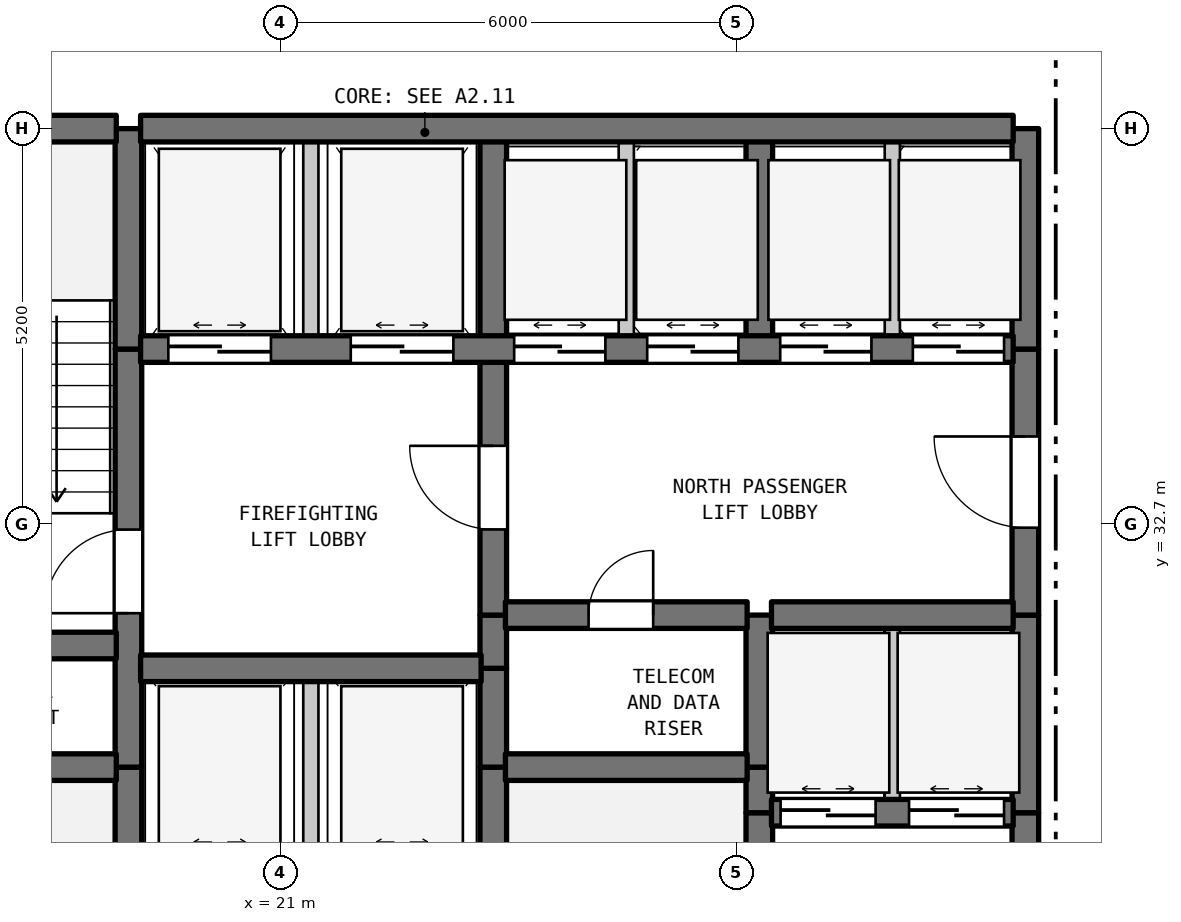
"""IFC4 building model, lengths in metres.
Left out: names, types, materials, properties, quantities, classifications, styles, units other than length and angle.
Written with IfcOpenShell. Run it as: python <this file> out.ifc"""

import sys

from ifc_helpers import new_model, si_unit, direction, frame, frame_2d, origin, place, context, subcontext, project, spatial, rectangle, extrude, element, fill, save


model = new_model("IFC4")
c1 = context("Model", 3, precision=1e-05, world=origin(), true_north=direction((0.0, 1.0)))
c2 = subcontext(c1, "Body", "Model", "MODEL_VIEW")
j1 = project(units=[si_unit("LENGTHUNIT", "METRE"), si_unit("PLANEANGLEUNIT", "RADIAN")], contexts=[c1])
p1 = place(None, origin())
s1 = spatial("IfcSite", under=j1, at=p1, CompositionType="ELEMENT")
p2 = place(p1, origin())
s2 = spatial("IfcBuilding", under=s1, at=p2, CompositionType="ELEMENT")
p3 = place(p2, frame((0.0, 0.0, 94.6)))
s3 = spatial("IfcBuildingStorey", under=s2, at=p3, CompositionType="ELEMENT", Elevation=94.6)
p4 = place(p3, frame((19.0, 28.2, 0.0), z_axis=(0.0, 0.0, 1.0), x_axis=(0.0, 1.0, 0.0)))
e1 = element("IfcWall", 1, at=p4, inside=s3, PredefinedType="SHEAR", context=c2, shape_type="SweptSolid", body=[
    extrude(rectangle(XDim=1.3, YDim=0.35, at=frame_2d((0.65, 0.0))), origin(), (0.0, 0.0, 1.0), 3.385),
])
p5 = place(p3, frame((19.0, 29.5, 0.0), z_axis=(0.0, 0.0, 1.0), x_axis=(0.0, 1.0, 0.0)))
e2 = element("IfcWall", 2, at=p5, inside=s3, PredefinedType="SHEAR", context=c2, shape_type="SweptSolid", body=[
    extrude(rectangle(XDim=5.5, YDim=0.35, at=frame_2d((2.75, 0.0))), origin(), (0.0, 0.0, 1.0), 3.385),
])
p6 = place(p5, frame((2.025, 0.0, 0.0)))
e3 = element("IfcOpeningElement", 3, at=p6, cuts=e2, PredefinedType="OPENING", context=c2, shape_type="SweptSolid", body=[
    extrude(rectangle(XDim=1.1, YDim=2.15, at=frame_2d((0.55, 1.075))), frame((0.0, 0.185, 0.0), z_axis=(0.0, -1.0, 0.0), x_axis=(1.0, 0.0, 0.0)), (0.0, 0.0, 1.0), 0.37),
])
p7 = place(p3, frame((19.0, 35.0, 0.0), z_axis=(0.0, 0.0, 1.0), x_axis=(0.0, 1.0, 0.0)))
e4 = element("IfcWall", 4, at=p7, inside=s3, PredefinedType="SHEAR", context=c2, shape_type="SweptSolid", body=[
    extrude(rectangle(XDim=2.9, YDim=0.35, at=frame_2d((1.45, 0.0))), origin(), (0.0, 0.0, 1.0), 3.385),
])
p8 = place(p3, frame((21.4, 28.2, 0.0), z_axis=(0.0, 0.0, 1.0), x_axis=(0.0, 1.0, 0.0)))
e5 = element("IfcWall", 5, at=p8, inside=s3, PredefinedType="STANDARD", context=c2, shape_type="SweptSolid", body=[
    extrude(rectangle(XDim=2.6, YDim=0.2, at=frame_2d((1.3, 0.0))), origin(), (0.0, 0.0, 1.0), 3.385),
])
p9 = place(p3, frame((21.4, 35.0, 0.0), z_axis=(0.0, 0.0, 1.0), x_axis=(0.0, 1.0, 0.0)))
e6 = element("IfcWall", 6, at=p9, inside=s3, PredefinedType="STANDARD", context=c2, shape_type="SweptSolid", body=[
    extrude(rectangle(XDim=2.9, YDim=0.2, at=frame_2d((1.45, 0.0))), origin(), (0.0, 0.0, 1.0), 3.385),
])
for number, where, z_axis, x_axis in (
    (7, (23.8, 28.2, 0.0), (0.0, 0.0, 1.0), (0.0, 1.0, 0.0)),
    (8, (23.8, 29.5, 0.0), (0.0, 0.0, 1.0), (0.0, 1.0, 0.0)),
):
    element("IfcWall", number, at=place(p3, frame(where, z_axis=z_axis, x_axis=x_axis)), inside=s3, PredefinedType="SHEAR", context=c2, shape_type="SweptSolid", body=[
        extrude(rectangle(XDim=1.3, YDim=0.35, at=frame_2d((0.65, 0.0))), origin(), (0.0, 0.0, 1.0), 3.385),
    ])
p10 = place(p3, frame((23.8, 30.8, 0.0), z_axis=(0.0, 0.0, 1.0), x_axis=(0.0, 1.0, 0.0)))
e9 = element("IfcWall", 9, at=p10, inside=s3, PredefinedType="SHEAR", context=c2, shape_type="SweptSolid", body=[
    extrude(rectangle(XDim=0.7, YDim=0.35, at=frame_2d((0.35, 0.0))), origin(), (0.0, 0.0, 1.0), 3.385),
])
p11 = place(p3, frame((23.8, 31.5, 0.0), z_axis=(0.0, 0.0, 1.0), x_axis=(0.0, 1.0, 0.0)))
e10 = element("IfcWall", 10, at=p11, inside=s3, PredefinedType="SHEAR", context=c2, shape_type="SweptSolid", body=[
    extrude(rectangle(XDim=3.5, YDim=0.35, at=frame_2d((1.75, 0.0))), origin(), (0.0, 0.0, 1.0), 3.385),
])
p12 = place(p11, frame((1.127, 0.0, 0.0)))
e11 = element("IfcOpeningElement", 11, at=p12, cuts=e10, PredefinedType="OPENING", context=c2, shape_type="SweptSolid", body=[
    extrude(rectangle(XDim=1.1, YDim=2.15, at=frame_2d((0.55, 1.075))), frame((0.0, 0.185, 0.0), z_axis=(0.0, -1.0, 0.0), x_axis=(1.0, 0.0, 0.0)), (0.0, 0.0, 1.0), 0.37),
])
p13 = place(p3, frame((23.8, 35.0, 0.0), z_axis=(0.0, 0.0, 1.0), x_axis=(0.0, 1.0, 0.0)))
e12 = element("IfcWall", 12, at=p13, inside=s3, PredefinedType="SHEAR", context=c2, shape_type="SweptSolid", body=[
    extrude(rectangle(XDim=2.9, YDim=0.35, at=frame_2d((1.45, 0.0))), origin(), (0.0, 0.0, 1.0), 3.385),
])
p14 = place(p3, frame((25.55, 35.0, 0.0), z_axis=(0.0, 0.0, 1.0), x_axis=(0.0, 1.0, 0.0)))
e13 = element("IfcWall", 13, at=p14, inside=s3, PredefinedType="STANDARD", context=c2, shape_type="SweptSolid", body=[
    extrude(rectangle(XDim=2.9, YDim=0.2, at=frame_2d((1.45, 0.0))), origin(), (0.0, 0.0, 1.0), 3.385),
])
p15 = place(p3, frame((27.3, 25.6, 0.0), z_axis=(0.0, 0.0, 1.0), x_axis=(0.0, 1.0, 0.0)))
e14 = element("IfcWall", 14, at=p15, inside=s3, PredefinedType="SHEAR", context=c2, shape_type="SweptSolid", body=[
    extrude(rectangle(XDim=3.3, YDim=0.35, at=frame_2d((1.65, 0.0))), origin(), (0.0, 0.0, 1.0), 3.385),
])
p16 = place(p3, frame((27.3, 28.9, 0.0), z_axis=(0.0, 0.0, 1.0), x_axis=(0.0, 1.0, 0.0)))
e15 = element("IfcWall", 15, at=p16, inside=s3, PredefinedType="SHEAR", context=c2, shape_type="SweptSolid", body=[
    extrude(rectangle(XDim=0.6, YDim=0.35, at=frame_2d((0.3, 0.0))), origin(), (0.0, 0.0, 1.0), 3.385),
])
p17 = place(p3, frame((27.3, 29.5, 0.0), z_axis=(0.0, 0.0, 1.0), x_axis=(0.0, 1.0, 0.0)))
e16 = element("IfcWall", 16, at=p17, inside=s3, PredefinedType="SHEAR", context=c2, shape_type="SweptSolid", body=[
    extrude(rectangle(XDim=2.0, YDim=0.35, at=frame_2d((1.0, 0.0))), origin(), (0.0, 0.0, 1.0), 3.385),
])
p18 = place(p3, frame((27.3, 35.0, 0.0), z_axis=(0.0, 0.0, 1.0), x_axis=(0.0, 1.0, 0.0)))
e17 = element("IfcWall", 17, at=p18, inside=s3, PredefinedType="SHEAR", context=c2, shape_type="SweptSolid", body=[
    extrude(rectangle(XDim=2.9, YDim=0.35, at=frame_2d((1.45, 0.0))), origin(), (0.0, 0.0, 1.0), 3.385),
])
p19 = place(p3, frame((29.05, 28.9, 0.0), z_axis=(0.0, 0.0, 1.0), x_axis=(0.0, 1.0, 0.0)))
e18 = element("IfcWall", 18, at=p19, inside=s3, PredefinedType="STANDARD", context=c2, shape_type="SweptSolid", body=[
    extrude(rectangle(XDim=2.6, YDim=0.2, at=frame_2d((1.3, 0.0))), origin(), (0.0, 0.0, 1.0), 3.385),
])
p20 = place(p3, frame((29.05, 35.0, 0.0), z_axis=(0.0, 0.0, 1.0), x_axis=(0.0, 1.0, 0.0)))
e19 = element("IfcWall", 19, at=p20, inside=s3, PredefinedType="STANDARD", context=c2, shape_type="SweptSolid", body=[
    extrude(rectangle(XDim=2.9, YDim=0.2, at=frame_2d((1.45, 0.0))), origin(), (0.0, 0.0, 1.0), 3.385),
])
p21 = place(p3, frame((30.8, 25.6, 0.0), z_axis=(0.0, 0.0, 1.0), x_axis=(0.0, 1.0, 0.0)))
e20 = element("IfcWall", 20, at=p21, inside=s3, PredefinedType="SHEAR", context=c2, shape_type="SweptSolid", body=[
    extrude(rectangle(XDim=3.3, YDim=0.35, at=frame_2d((1.65, 0.0))), origin(), (0.0, 0.0, 1.0), 3.385),
])
p22 = place(p21, frame((0.978, 0.0, 0.0)))
e21 = element("IfcOpeningElement", 21, at=p22, cuts=e20, PredefinedType="OPENING", context=c2, shape_type="SweptSolid", body=[
    extrude(rectangle(XDim=1.2, YDim=2.2, at=frame_2d((0.6, 1.1))), frame((0.0, 0.185, 0.0), z_axis=(0.0, -1.0, 0.0), x_axis=(1.0, 0.0, 0.0)), (0.0, 0.0, 1.0), 0.37),
])
p23 = place(p3, frame((30.8, 28.9, 0.0), z_axis=(0.0, 0.0, 1.0), x_axis=(0.0, 1.0, 0.0)))
e22 = element("IfcWall", 22, at=p23, inside=s3, PredefinedType="SHEAR", context=c2, shape_type="SweptSolid", body=[
    extrude(rectangle(XDim=2.6, YDim=0.35, at=frame_2d((1.3, 0.0))), origin(), (0.0, 0.0, 1.0), 3.385),
])
p24 = place(p3, frame((30.8, 31.5, 0.0), z_axis=(0.0, 0.0, 1.0), x_axis=(0.0, 1.0, 0.0)))
e23 = element("IfcWall", 23, at=p24, inside=s3, PredefinedType="SHEAR", context=c2, shape_type="SweptSolid", body=[
    extrude(rectangle(XDim=3.5, YDim=0.35, at=frame_2d((1.75, 0.0))), origin(), (0.0, 0.0, 1.0), 3.385),
])
p25 = place(p24, frame((1.15, 0.0, 0.0)))
e24 = element("IfcOpeningElement", 24, at=p25, cuts=e23, PredefinedType="OPENING", context=c2, shape_type="SweptSolid", body=[
    extrude(rectangle(XDim=1.2, YDim=2.2, at=frame_2d((0.6, 1.1))), frame((0.0, 0.185, 0.0), z_axis=(0.0, -1.0, 0.0), x_axis=(1.0, 0.0, 0.0)), (0.0, 0.0, 1.0), 0.37),
])
p26 = place(p3, frame((30.8, 35.0, 0.0), z_axis=(0.0, 0.0, 1.0), x_axis=(0.0, 1.0, 0.0)))
e25 = element("IfcWall", 25, at=p26, inside=s3, PredefinedType="SHEAR", context=c2, shape_type="SweptSolid", body=[
    extrude(rectangle(XDim=2.9, YDim=0.35, at=frame_2d((1.45, 0.0))), origin(), (0.0, 0.0, 1.0), 3.385),
])
p27 = place(p3, frame((27.46, 28.9, 0.0), z_axis=(0.0, 0.0, 1.0), x_axis=(1.0, 0.0, 0.0)))
e26 = element("IfcWall", 26, at=p27, inside=s3, PredefinedType="SHEAR", context=c2, shape_type="SweptSolid", body=[
    extrude(rectangle(XDim=3.18, YDim=0.35, at=frame_2d((1.59, 0.0))), origin(), (0.0, 0.0, 1.0), 3.385),
])
p28 = place(p27, frame((0.12, 0.0, 0.0)))
e27 = element("IfcOpeningElement", 27, at=p28, cuts=e26, PredefinedType="OPENING", context=c2, shape_type="SweptSolid", body=[
    extrude(rectangle(XDim=1.25, YDim=2.2, at=frame_2d((0.625, 1.1))), frame((0.0, 0.185, 0.0), z_axis=(0.0, -1.0, 0.0), x_axis=(1.0, 0.0, 0.0)), (0.0, 0.0, 1.0), 0.37),
])
p29 = place(p27, frame((1.81, 0.0, 0.0)))
e28 = element("IfcOpeningElement", 28, at=p29, cuts=e26, PredefinedType="OPENING", context=c2, shape_type="SweptSolid", body=[
    extrude(rectangle(XDim=1.25, YDim=2.2, at=frame_2d((0.625, 1.1))), frame((0.0, 0.185, 0.0), z_axis=(0.0, -1.0, 0.0), x_axis=(1.0, 0.0, 0.0)), (0.0, 0.0, 1.0), 0.37),
])
p30 = place(p3, frame((15.16, 29.5, 0.0), z_axis=(0.0, 0.0, 1.0), x_axis=(1.0, 0.0, 0.0)))
e29 = element("IfcWall", 29, at=p30, inside=s3, PredefinedType="SHEAR", context=c2, shape_type="SweptSolid", body=[
    extrude(rectangle(XDim=3.68, YDim=0.35, at=frame_2d((1.84, 0.0))), origin(), (0.0, 0.0, 1.0), 3.385),
])
p31 = place(p3, frame((23.96, 29.5, 0.0), z_axis=(0.0, 0.0, 1.0), x_axis=(1.0, 0.0, 0.0)))
e30 = element("IfcWall", 30, at=p31, inside=s3, PredefinedType="SHEAR", context=c2, shape_type="SweptSolid", body=[
    extrude(rectangle(XDim=3.18, YDim=0.35, at=frame_2d((1.59, 0.0))), origin(), (0.0, 0.0, 1.0), 3.385),
])
p32 = place(p3, frame((19.16, 30.8, 0.0), z_axis=(0.0, 0.0, 1.0), x_axis=(1.0, 0.0, 0.0)))
e31 = element("IfcWall", 31, at=p32, inside=s3, PredefinedType="SHEAR", context=c2, shape_type="SweptSolid", body=[
    extrude(rectangle(XDim=4.48, YDim=0.35, at=frame_2d((2.24, 0.0))), origin(), (0.0, 0.0, 1.0), 3.385),
])
p33 = place(p3, frame((15.16, 31.1, 0.0), z_axis=(0.0, 0.0, 1.0), x_axis=(1.0, 0.0, 0.0)))
e32 = element("IfcWall", 32, at=p33, inside=s3, PredefinedType="SHEAR", context=c2, shape_type="SweptSolid", body=[
    extrude(rectangle(XDim=3.68, YDim=0.35, at=frame_2d((1.84, 0.0))), origin(), (0.0, 0.0, 1.0), 3.385),
])
p34 = place(p3, frame((23.96, 31.5, 0.0), z_axis=(0.0, 0.0, 1.0), x_axis=(1.0, 0.0, 0.0)))
e33 = element("IfcWall", 33, at=p34, inside=s3, PredefinedType="SHEAR", context=c2, shape_type="SweptSolid", body=[
    extrude(rectangle(XDim=3.18, YDim=0.35, at=frame_2d((1.59, 0.0))), origin(), (0.0, 0.0, 1.0), 3.385),
])
p35 = place(p34, frame((1.094, 0.0, 0.0)))
e34 = element("IfcOpeningElement", 34, at=p35, cuts=e33, PredefinedType="OPENING", context=c2, shape_type="SweptSolid", body=[
    extrude(rectangle(XDim=0.85, YDim=2.1, at=frame_2d((0.425, 1.05))), frame((0.0, 0.185, 0.0), z_axis=(0.0, -1.0, 0.0), x_axis=(1.0, 0.0, 0.0)), (0.0, 0.0, 1.0), 0.37),
])
p36 = place(p3, frame((27.46, 31.5, 0.0), z_axis=(0.0, 0.0, 1.0), x_axis=(1.0, 0.0, 0.0)))
e35 = element("IfcWall", 35, at=p36, inside=s3, PredefinedType="SHEAR", context=c2, shape_type="SweptSolid", body=[
    extrude(rectangle(XDim=3.18, YDim=0.35, at=frame_2d((1.59, 0.0))), origin(), (0.0, 0.0, 1.0), 3.385),
])
p37 = place(p3, frame((19.16, 35.0, 0.0), z_axis=(0.0, 0.0, 1.0), x_axis=(1.0, 0.0, 0.0)))
e36 = element("IfcWall", 36, at=p37, inside=s3, PredefinedType="SHEAR", context=c2, shape_type="SweptSolid", body=[
    extrude(rectangle(XDim=11.48, YDim=0.35, at=frame_2d((5.74, 0.0))), origin(), (0.0, 0.0, 1.0), 3.385),
])
p38 = place(p37, frame((0.365, 0.0, 0.0)))
e37 = element("IfcOpeningElement", 37, at=p38, cuts=e36, PredefinedType="OPENING", context=c2, shape_type="SweptSolid", body=[
    extrude(rectangle(XDim=1.35, YDim=2.2, at=frame_2d((0.675, 1.1))), frame((0.0, 0.185, 0.0), z_axis=(0.0, -1.0, 0.0), x_axis=(1.0, 0.0, 0.0)), (0.0, 0.0, 1.0), 0.37),
])
p39 = place(p37, frame((2.765, 0.0, 0.0)))
e38 = element("IfcOpeningElement", 38, at=p39, cuts=e36, PredefinedType="OPENING", context=c2, shape_type="SweptSolid", body=[
    extrude(rectangle(XDim=1.35, YDim=2.2, at=frame_2d((0.675, 1.1))), frame((0.0, 0.185, 0.0), z_axis=(0.0, -1.0, 0.0), x_axis=(1.0, 0.0, 0.0)), (0.0, 0.0, 1.0), 0.37),
])
p40 = place(p37, frame((4.915, 0.0, 0.0)))
e39 = element("IfcOpeningElement", 39, at=p40, cuts=e36, PredefinedType="OPENING", context=c2, shape_type="SweptSolid", body=[
    extrude(rectangle(XDim=1.2, YDim=2.2, at=frame_2d((0.6, 1.1))), frame((0.0, 0.185, 0.0), z_axis=(0.0, -1.0, 0.0), x_axis=(1.0, 0.0, 0.0)), (0.0, 0.0, 1.0), 0.37),
])
p41 = place(p37, frame((6.665, 0.0, 0.0)))
e40 = element("IfcOpeningElement", 40, at=p41, cuts=e36, PredefinedType="OPENING", context=c2, shape_type="SweptSolid", body=[
    extrude(rectangle(XDim=1.2, YDim=2.2, at=frame_2d((0.6, 1.1))), frame((0.0, 0.185, 0.0), z_axis=(0.0, -1.0, 0.0), x_axis=(1.0, 0.0, 0.0)), (0.0, 0.0, 1.0), 0.37),
])
p42 = place(p37, frame((8.415, 0.0, 0.0)))
e41 = element("IfcOpeningElement", 41, at=p42, cuts=e36, PredefinedType="OPENING", context=c2, shape_type="SweptSolid", body=[
    extrude(rectangle(XDim=1.2, YDim=2.2, at=frame_2d((0.6, 1.1))), frame((0.0, 0.185, 0.0), z_axis=(0.0, -1.0, 0.0), x_axis=(1.0, 0.0, 0.0)), (0.0, 0.0, 1.0), 0.37),
])
p43 = place(p37, frame((10.16, 0.0, 0.0)))
e42 = element("IfcOpeningElement", 42, at=p43, cuts=e36, PredefinedType="OPENING", context=c2, shape_type="SweptSolid", body=[
    extrude(rectangle(XDim=1.2, YDim=2.2, at=frame_2d((0.6, 1.1))), frame((0.0, 0.185, 0.0), z_axis=(0.0, -1.0, 0.0), x_axis=(1.0, 0.0, 0.0)), (0.0, 0.0, 1.0), 0.37),
])
p44 = place(p3, frame((15.16, 37.9, 0.0), z_axis=(0.0, 0.0, 1.0), x_axis=(1.0, 0.0, 0.0)))
e43 = element("IfcWall", 43, at=p44, inside=s3, PredefinedType="SHEAR", context=c2, shape_type="SweptSolid", body=[
    extrude(rectangle(XDim=3.68, YDim=0.35, at=frame_2d((1.84, 0.0))), origin(), (0.0, 0.0, 1.0), 3.385),
])
p45 = place(p3, frame((19.16, 37.9, 0.0), z_axis=(0.0, 0.0, 1.0), x_axis=(1.0, 0.0, 0.0)))
e44 = element("IfcWall", 44, at=p45, inside=s3, PredefinedType="SHEAR", context=c2, shape_type="SweptSolid", body=[
    extrude(rectangle(XDim=11.48, YDim=0.35, at=frame_2d((5.74, 0.0))), origin(), (0.0, 0.0, 1.0), 3.385),
])
p46 = place(p6, origin())
e45 = element("IfcDoor", 45, at=p46, inside=s3, OperationType="SINGLE_SWING_LEFT", PredefinedType="DOOR", context=c2, shape_type="SweptSolid", body=[
    extrude(rectangle(XDim=1.1, YDim=2.15, at=frame_2d((0.55, 1.075))), frame((0.0, 0.025, 0.0), z_axis=(0.0, -1.0, 0.0), x_axis=(1.0, 0.0, 0.0)), (0.0, 0.0, 1.0), 0.05),
])
fill(e3, e45)
p47 = place(p12, origin())
e46 = element("IfcDoor", 46, at=p47, inside=s3, OperationType="SINGLE_SWING_RIGHT", PredefinedType="DOOR", context=c2, shape_type="SweptSolid", body=[
    extrude(rectangle(XDim=1.1, YDim=2.15, at=frame_2d((0.55, 1.075))), frame((0.0, 0.025, 0.0), z_axis=(0.0, -1.0, 0.0), x_axis=(1.0, 0.0, 0.0)), (0.0, 0.0, 1.0), 0.05),
])
fill(e11, e46)
p48 = place(p25, origin())
e47 = element("IfcDoor", 47, at=p48, inside=s3, OperationType="SINGLE_SWING_RIGHT", PredefinedType="DOOR", context=c2, shape_type="SweptSolid", body=[
    extrude(rectangle(XDim=1.2, YDim=2.2, at=frame_2d((0.6, 1.1))), frame((0.0, 0.025, 0.0), z_axis=(0.0, -1.0, 0.0), x_axis=(1.0, 0.0, 0.0)), (0.0, 0.0, 1.0), 0.05),
])
fill(e24, e47)
p49 = place(p28, origin())
e48 = element("IfcDoor", 48, at=p49, inside=s3, OperationType="DOUBLE_DOOR_SLIDING", PredefinedType="DOOR", context=c2, shape_type="SweptSolid", body=[
    extrude(rectangle(XDim=1.25, YDim=2.2, at=frame_2d((0.625, 1.1))), frame((0.0, 0.025, 0.0), z_axis=(0.0, -1.0, 0.0), x_axis=(1.0, 0.0, 0.0)), (0.0, 0.0, 1.0), 0.05),
])
fill(e27, e48)
p50 = place(p29, origin())
e49 = element("IfcDoor", 49, at=p50, inside=s3, OperationType="DOUBLE_DOOR_SLIDING", PredefinedType="DOOR", context=c2, shape_type="SweptSolid", body=[
    extrude(rectangle(XDim=1.25, YDim=2.2, at=frame_2d((0.625, 1.1))), frame((0.0, 0.025, 0.0), z_axis=(0.0, -1.0, 0.0), x_axis=(1.0, 0.0, 0.0)), (0.0, 0.0, 1.0), 0.05),
])
fill(e28, e49)
p51 = place(p35, origin())
e50 = element("IfcDoor", 50, at=p51, inside=s3, OperationType="SINGLE_SWING_RIGHT", PredefinedType="DOOR", context=c2, shape_type="SweptSolid", body=[
    extrude(rectangle(XDim=0.85, YDim=2.1, at=frame_2d((0.425, 1.05))), frame((0.0, 0.025, 0.0), z_axis=(0.0, -1.0, 0.0), x_axis=(1.0, 0.0, 0.0)), (0.0, 0.0, 1.0), 0.05),
])
fill(e34, e50)
p52 = place(p38, origin())
e51 = element("IfcDoor", 51, at=p52, inside=s3, OperationType="DOUBLE_DOOR_SLIDING", PredefinedType="DOOR", context=c2, shape_type="SweptSolid", body=[
    extrude(rectangle(XDim=1.35, YDim=2.2, at=frame_2d((0.675, 1.1))), frame((0.0, 0.025, 0.0), z_axis=(0.0, -1.0, 0.0), x_axis=(1.0, 0.0, 0.0)), (0.0, 0.0, 1.0), 0.05),
])
fill(e37, e51)
p53 = place(p39, origin())
e52 = element("IfcDoor", 52, at=p53, inside=s3, OperationType="DOUBLE_DOOR_SLIDING", PredefinedType="DOOR", context=c2, shape_type="SweptSolid", body=[
    extrude(rectangle(XDim=1.35, YDim=2.2, at=frame_2d((0.675, 1.1))), frame((0.0, 0.025, 0.0), z_axis=(0.0, -1.0, 0.0), x_axis=(1.0, 0.0, 0.0)), (0.0, 0.0, 1.0), 0.05),
])
fill(e38, e52)
p54 = place(p40, origin())
e53 = element("IfcDoor", 53, at=p54, inside=s3, OperationType="DOUBLE_DOOR_SLIDING", PredefinedType="DOOR", context=c2, shape_type="SweptSolid", body=[
    extrude(rectangle(XDim=1.2, YDim=2.2, at=frame_2d((0.6, 1.1))), frame((0.0, 0.025, 0.0), z_axis=(0.0, -1.0, 0.0), x_axis=(1.0, 0.0, 0.0)), (0.0, 0.0, 1.0), 0.05),
])
fill(e39, e53)
p55 = place(p41, origin())
e54 = element("IfcDoor", 54, at=p55, inside=s3, OperationType="DOUBLE_DOOR_SLIDING", PredefinedType="DOOR", context=c2, shape_type="SweptSolid", body=[
    extrude(rectangle(XDim=1.2, YDim=2.2, at=frame_2d((0.6, 1.1))), frame((0.0, 0.025, 0.0), z_axis=(0.0, -1.0, 0.0), x_axis=(1.0, 0.0, 0.0)), (0.0, 0.0, 1.0), 0.05),
])
fill(e40, e54)
p56 = place(p42, origin())
e55 = element("IfcDoor", 55, at=p56, inside=s3, OperationType="DOUBLE_DOOR_SLIDING", PredefinedType="DOOR", context=c2, shape_type="SweptSolid", body=[
    extrude(rectangle(XDim=1.2, YDim=2.2, at=frame_2d((0.6, 1.1))), frame((0.0, 0.025, 0.0), z_axis=(0.0, -1.0, 0.0), x_axis=(1.0, 0.0, 0.0)), (0.0, 0.0, 1.0), 0.05),
])
fill(e41, e55)
p57 = place(p43, origin())
e56 = element("IfcDoor", 56, at=p57, inside=s3, OperationType="DOUBLE_DOOR_SLIDING", PredefinedType="DOOR", context=c2, shape_type="SweptSolid", body=[
    extrude(rectangle(XDim=1.2, YDim=2.2, at=frame_2d((0.6, 1.1))), frame((0.0, 0.025, 0.0), z_axis=(0.0, -1.0, 0.0), x_axis=(1.0, 0.0, 0.0)), (0.0, 0.0, 1.0), 0.05),
])
fill(e42, e56)
save(model, sys.argv[1])
